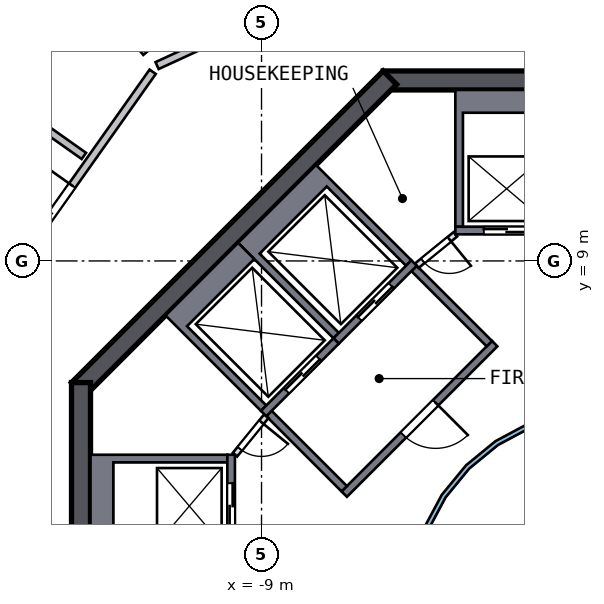
"""IFC4 building model, lengths in metres.
Left out: names, types, materials, properties, quantities, classifications, styles, units other than length and angle.
Written with IfcOpenShell. Run it as: python <this file> out.ifc"""

import sys

from ifc_helpers import new_model, si_unit, direction, frame, frame_2d, origin, place, context, subcontext, project, spatial, polyline, rectangle, outline, extrude, element, fill, save


model = new_model("IFC4")
c1 = context("Model", 3, precision=1e-05, world=origin(), true_north=direction((0.0, 1.0)))
c2 = subcontext(c1, "Body", "Model", "MODEL_VIEW")
j1 = project(units=[si_unit("LENGTHUNIT", "METRE"), si_unit("PLANEANGLEUNIT", "RADIAN")], contexts=[c1])
p1 = place(None, origin())
s1 = spatial("IfcSite", under=j1, at=p1, CompositionType="ELEMENT")
p2 = place(p1, origin())
s2 = spatial("IfcBuilding", under=s1, at=p2, CompositionType="ELEMENT")
p3 = place(p2, frame((0.0, 0.0, 256.0)))
s3 = spatial("IfcBuildingStorey", under=s2, at=p3, CompositionType="ELEMENT", Elevation=256.0)
p4 = place(p3, frame((5.799, 13.75, 0.0), z_axis=(0.0, 0.0, 1.0), x_axis=(-1.0, 0.0, 0.0)))
e1 = element("IfcWall", 1, at=p4, inside=s3, PredefinedType="SHEAR", context=c2, shape_type="SweptSolid", body=[
    extrude(rectangle(XDim=11.598, YDim=0.5, at=frame_2d((5.799, 0.0))), origin(), (0.0, 0.0, 1.0), 3.5),
])
p5 = place(p4, frame((4.899, 0.0, 0.0)))
e2 = element("IfcOpeningElement", 2, at=p5, cuts=e1, PredefinedType="OPENING", context=c2, shape_type="SweptSolid", body=[
    extrude(rectangle(XDim=1.8, YDim=2.1, at=frame_2d((0.9, 1.05))), frame((0.0, 0.26, 0.0), z_axis=(0.0, -1.0, 0.0), x_axis=(1.0, 0.0, 0.0)), (0.0, 0.0, 1.0), 0.52),
])
p6 = place(p3, frame((-5.622, 13.823, 0.0), z_axis=(0.0, 0.0, 1.0), x_axis=(-0.707106781, -0.707106781, 0.0)))
e3 = element("IfcWall", 3, at=p6, inside=s3, PredefinedType="SHEAR", context=c2, shape_type="SweptSolid", body=[
    extrude(rectangle(XDim=11.598, YDim=0.5, at=frame_2d((5.799, 0.0))), origin(), (0.0, 0.0, 1.0), 3.5),
])
p7 = place(p3, frame((-13.75, 5.799, 0.0), z_axis=(0.0, 0.0, 1.0), x_axis=(0.0, -1.0, 0.0)))
e4 = element("IfcWall", 4, at=p7, inside=s3, PredefinedType="SHEAR", context=c2, shape_type="SweptSolid", body=[
    extrude(rectangle(XDim=11.598, YDim=0.5, at=frame_2d((5.799, 0.0))), origin(), (0.0, 0.0, 1.0), 3.5),
])
p8 = place(p7, frame((4.899, 0.0, 0.0)))
e5 = element("IfcOpeningElement", 5, at=p8, cuts=e4, PredefinedType="OPENING", context=c2, shape_type="SweptSolid", body=[
    extrude(rectangle(XDim=1.8, YDim=2.1, at=frame_2d((0.9, 1.05))), frame((0.0, 0.26, 0.0), z_axis=(0.0, -1.0, 0.0), x_axis=(1.0, 0.0, 0.0)), (0.0, 0.0, 1.0), 0.52),
])
p9 = place(p3, origin())
e6 = element("IfcWall", 6, at=p9, inside=s3, PredefinedType="SOLIDWALL", context=c2, shape_type="SweptSolid", body=[
    extrude(outline(polyline([(-3.9, 13.5), (-1.2, 13.5), (-1.2, 9.9), (-1.4, 9.9), (-1.4, 12.9), (-3.7, 12.9), (-3.7, 9.9), (-3.9, 9.9), (-3.9, 13.5)])), origin(), (0.0, 0.0, 1.0), 3.19),
])
p10 = place(p3, frame((-1.2, 9.8, 0.0), z_axis=(0.0, 0.0, 1.0), x_axis=(-1.0, 0.0, 0.0)))
e7 = element("IfcWall", 7, at=p10, inside=s3, PredefinedType="SOLIDWALL", context=c2, shape_type="SweptSolid", body=[
    extrude(rectangle(XDim=2.7, YDim=0.2, at=frame_2d((1.35, 0.0))), origin(), (0.0, 0.0, 1.0), 3.19),
])
p11 = place(p10, frame((0.75, 0.0, 0.0)))
e8 = element("IfcOpeningElement", 8, at=p11, cuts=e7, PredefinedType="OPENING", context=c2, shape_type="SweptSolid", body=[
    extrude(rectangle(XDim=1.2, YDim=2.1, at=frame_2d((0.6, 1.05))), frame((0.0, 0.11, 0.0), z_axis=(0.0, -1.0, 0.0), x_axis=(1.0, 0.0, 0.0)), (0.0, 0.0, 1.0), 0.22),
])
p12 = place(p3, origin())
e9 = element("IfcWall", 9, at=p12, inside=s3, PredefinedType="SOLIDWALL", context=c2, shape_type="SweptSolid", body=[
    extrude(outline(polyline([(-13.5, 3.9), (-9.9, 3.9), (-9.9, 3.7), (-12.9, 3.7), (-12.9, 1.4), (-9.9, 1.4), (-9.9, 1.2), (-13.5, 1.2), (-13.5, 3.9)])), origin(), (0.0, 0.0, 1.0), 3.19),
])
p13 = place(p3, frame((-9.8, 1.2, 0.0), z_axis=(0.0, 0.0, 1.0), x_axis=(0.0, 1.0, 0.0)))
e10 = element("IfcWall", 10, at=p13, inside=s3, PredefinedType="SOLIDWALL", context=c2, shape_type="SweptSolid", body=[
    extrude(rectangle(XDim=2.7, YDim=0.2, at=frame_2d((1.35, 0.0))), origin(), (0.0, 0.0, 1.0), 3.19),
])
p14 = place(p13, frame((0.75, 0.0, 0.0)))
e11 = element("IfcOpeningElement", 11, at=p14, cuts=e10, PredefinedType="OPENING", context=c2, shape_type="SweptSolid", body=[
    extrude(rectangle(XDim=1.2, YDim=2.1, at=frame_2d((0.6, 1.05))), frame((0.0, 0.11, 0.0), z_axis=(0.0, -1.0, 0.0), x_axis=(1.0, 0.0, 0.0)), (0.0, 0.0, 1.0), 0.22),
])
p15 = place(p3, origin())
e12 = element("IfcWall", 12, at=p15, inside=s3, PredefinedType="SOLIDWALL", context=c2, shape_type="SweptSolid", body=[
    extrude(outline(polyline([(-9.617, 9.475), (-7.566, 11.526), (-5.056, 9.016), (-5.197, 8.874), (-7.283, 10.96), (-9.051, 9.192), (-6.965, 7.106), (-7.106, 6.965), (-9.617, 9.475)])), origin(), (0.0, 0.0, 1.0), 3.19),
])
p16 = place(p3, frame((-4.985, 8.945, 0.0), z_axis=(0.0, 0.0, 1.0), x_axis=(-0.707106781, -0.707106781, 0.0)))
e13 = element("IfcWall", 13, at=p16, inside=s3, PredefinedType="SOLIDWALL", context=c2, shape_type="SweptSolid", body=[
    extrude(rectangle(XDim=2.9, YDim=0.2, at=frame_2d((1.45, 0.0))), origin(), (0.0, 0.0, 1.0), 3.19),
])
p17 = place(p16, frame((0.85, 0.0, 0.0)))
e14 = element("IfcOpeningElement", 14, at=p17, cuts=e13, PredefinedType="OPENING", context=c2, shape_type="SweptSolid", body=[
    extrude(rectangle(XDim=1.2, YDim=2.1, at=frame_2d((0.6, 1.05))), frame((0.0, 0.11, 0.0), z_axis=(0.0, -1.0, 0.0), x_axis=(1.0, 0.0, 0.0)), (0.0, 0.0, 1.0), 0.22),
])
p18 = place(p3, origin())
e15 = element("IfcWall", 15, at=p18, inside=s3, PredefinedType="SOLIDWALL", context=c2, shape_type="SweptSolid", body=[
    extrude(outline(polyline([(-11.526, 7.566), (-9.617, 9.475), (-9.192, 9.051), (-10.96, 7.283), (-8.874, 5.197), (-9.016, 5.056), (-11.526, 7.566)])), origin(), (0.0, 0.0, 1.0), 3.19),
])
p19 = place(p3, frame((-7.036, 6.894, 0.0), z_axis=(0.0, 0.0, 1.0), x_axis=(-0.707106781, -0.707106781, 0.0)))
e16 = element("IfcWall", 16, at=p19, inside=s3, PredefinedType="SOLIDWALL", context=c2, shape_type="SweptSolid", body=[
    extrude(rectangle(XDim=2.7, YDim=0.2, at=frame_2d((1.35, 0.0))), origin(), (0.0, 0.0, 1.0), 3.19),
])
p20 = place(p19, frame((0.65, 0.0, 0.0)))
e17 = element("IfcOpeningElement", 17, at=p20, cuts=e16, PredefinedType="OPENING", context=c2, shape_type="SweptSolid", body=[
    extrude(rectangle(XDim=1.2, YDim=2.1, at=frame_2d((0.6, 1.05))), frame((0.0, 0.11, 0.0), z_axis=(0.0, -1.0, 0.0), x_axis=(1.0, 0.0, 0.0)), (0.0, 0.0, 1.0), 0.22),
])
p21 = place(p3, frame((-2.864, 6.823, 0.0), z_axis=(0.0, 0.0, 1.0), x_axis=(-0.707106781, -0.707106781, 0.0)))
e18 = element("IfcWall", 18, at=p21, inside=s3, PredefinedType="SOLIDWALL", context=c2, shape_type="SweptSolid", body=[
    extrude(rectangle(XDim=5.6, YDim=0.2, at=frame_2d((2.8, 0.0))), origin(), (0.0, 0.0, 1.0), 3.19),
])
p22 = place(p21, frame((2.2, 0.0, 0.0)))
e19 = element("IfcOpeningElement", 19, at=p22, cuts=e18, PredefinedType="OPENING", context=c2, shape_type="SweptSolid", body=[
    extrude(rectangle(XDim=1.2, YDim=2.1, at=frame_2d((0.6, 1.05))), frame((0.0, 0.11, 0.0), z_axis=(0.0, -1.0, 0.0), x_axis=(1.0, 0.0, 0.0)), (0.0, 0.0, 1.0), 0.22),
])
for number, where, z_axis, x_axis in (
    (20, (-3.005, 6.823, 0.0), (0.0, 0.0, 1.0), (-0.707, 0.707, 0.0)),
    (21, (-6.823, 3.005, 0.0), (0.0, 0.0, 1.0), (-0.707, 0.707, 0.0)),
):
    element("IfcWall", number, at=place(p3, frame(where, z_axis=z_axis, x_axis=x_axis)), inside=s3, PredefinedType="SOLIDWALL", context=c2, shape_type="SweptSolid", body=[
        extrude(rectangle(XDim=2.8, YDim=0.2, at=frame_2d((1.4, 0.0))), origin(), (0.0, 0.0, 1.0), 3.19),
    ])
p23 = place(p3, frame((-3.9, 9.7, 0.0), z_axis=(0.0, 0.0, 1.0), x_axis=(-0.775559878, -0.631274009, 0.0)))
e22 = element("IfcWall", 22, at=p23, inside=s3, PredefinedType="PARTITIONING", context=c2, shape_type="SweptSolid", body=[
    extrude(rectangle(XDim=1.308, YDim=0.15, at=frame_2d((0.654, 0.0))), origin(), (0.0, 0.0, 1.0), 3.19),
])
p24 = place(p23, frame((0.204, 0.0, 0.0)))
e23 = element("IfcOpeningElement", 23, at=p24, cuts=e22, PredefinedType="OPENING", context=c2, shape_type="SweptSolid", body=[
    extrude(rectangle(XDim=0.9, YDim=2.1, at=frame_2d((0.45, 1.05))), frame((0.0, 0.085, 0.0), z_axis=(0.0, -1.0, 0.0), x_axis=(1.0, 0.0, 0.0)), (0.0, 0.0, 1.0), 0.17),
])
p25 = place(p3, frame((-8.874, 4.914, 0.0), z_axis=(0.0, 0.0, 1.0), x_axis=(-0.631274009, -0.775559878, 0.0)))
e24 = element("IfcWall", 24, at=p25, inside=s3, PredefinedType="PARTITIONING", context=c2, shape_type="SweptSolid", body=[
    extrude(rectangle(XDim=1.308, YDim=0.15, at=frame_2d((0.654, 0.0))), origin(), (0.0, 0.0, 1.0), 3.19),
])
p26 = place(p25, frame((0.204, 0.0, 0.0)))
e25 = element("IfcOpeningElement", 25, at=p26, cuts=e24, PredefinedType="OPENING", context=c2, shape_type="SweptSolid", body=[
    extrude(rectangle(XDim=0.9, YDim=2.1, at=frame_2d((0.45, 1.05))), frame((0.0, 0.085, 0.0), z_axis=(0.0, -1.0, 0.0), x_axis=(1.0, 0.0, 0.0)), (0.0, 0.0, 1.0), 0.17),
])
p27 = place(p3, origin())
e26 = element("IfcWall", 26, at=p27, inside=s3, PredefinedType="SOLIDWALL", context=c2, shape_type="SweptSolid", body=[
    extrude(outline(polyline([(5.021, -0.999), (4.73, -1.959), (4.257, -2.844), (3.62, -3.62), (2.844, -4.257), (1.959, -4.73), (0.999, -5.021), (0.0, -5.12), (-0.999, -5.021), (-1.959, -4.73), (-2.844, -4.257), (-3.62, -3.62), (-4.257, -2.844), (-4.73, -1.959), (-5.021, -0.999), (-5.12, 0.0), (-5.021, 0.999), (-4.73, 1.959), (-4.257, 2.844), (-3.62, 3.62), (-2.844, 4.257), (-1.959, 4.73), (-0.999, 5.021), (0.0, 5.12), (0.999, 5.021), (1.959, 4.73), (2.844, 4.257), (3.62, 3.62), (4.257, 2.844), (4.73, 1.959), (5.021, 0.999), (5.12, 0.0), (5.021, -0.999)]), holes=[polyline([(4.904, 0.976), (4.619, 1.913), (4.157, 2.778), (3.535, 3.535), (2.778, 4.157), (1.913, 4.619), (0.976, 4.904), (0.0, 5.0), (-0.976, 4.904), (-1.913, 4.619), (-2.778, 4.157), (-3.535, 3.535), (-4.157, 2.778), (-4.619, 1.913), (-4.904, 0.976), (-5.0, 0.0), (-4.904, -0.976), (-4.619, -1.913), (-4.157, -2.778), (-3.535, -3.535), (-2.778, -4.157), (-1.913, -4.619), (-0.976, -4.904), (0.0, -5.0), (0.976, -4.904), (1.913, -4.619), (2.778, -4.157), (3.535, -3.535), (4.157, -2.778), (4.619, -1.913), (4.904, -0.976), (5.0, 0.0), (4.904, 0.976)])]), origin(), (0.0, 0.0, 1.0), 3.19),
])
p28 = place(p3, frame((-17.245, 6.372, 0.0), z_axis=(0.0, 0.0, 1.0), x_axis=(0.577581016, 0.81633337, 0.0)))
e27 = element("IfcWall", 27, at=p28, inside=s3, PredefinedType="SOLIDWALL", context=c2, shape_type="SweptSolid", body=[
    extrude(rectangle(XDim=9.317, YDim=0.2, at=frame_2d((4.658, 0.0))), origin(), (0.0, 0.0, 1.0), 3.19),
])
p29 = place(p28, frame((3.848, 0.0, 0.0)))
e28 = element("IfcOpeningElement", 28, at=p29, cuts=e27, PredefinedType="OPENING", context=c2, shape_type="SweptSolid", body=[
    extrude(rectangle(XDim=1.8, YDim=2.1, at=frame_2d((0.9, 1.05))), frame((0.0, 0.11, 0.0), z_axis=(0.0, -1.0, 0.0), x_axis=(1.0, 0.0, 0.0)), (0.0, 0.0, 1.0), 0.22),
])
p30 = place(p3, frame((-3.104, 18.121, 0.0), z_axis=(0.0, 0.0, 1.0), x_axis=(-0.908361445, -0.418185945, 0.0)))
e29 = element("IfcWall", 29, at=p30, inside=s3, PredefinedType="SOLIDWALL", context=c2, shape_type="SweptSolid", body=[
    extrude(rectangle(XDim=9.516, YDim=0.2, at=frame_2d((4.758, 0.0))), origin(), (0.0, 0.0, 1.0), 3.19),
])
p31 = place(p3, frame((-22.085, 17.714, 0.0), z_axis=(0.0, 0.0, 1.0), x_axis=(0.816344784, -0.577564883, 0.0)))
e30 = element("IfcWall", 30, at=p31, inside=s3, PredefinedType="SOLIDWALL", context=c2, shape_type="SweptSolid", body=[
    extrude(rectangle(XDim=10.302, YDim=0.2, at=frame_2d((5.151, 0.0))), origin(), (0.0, 0.0, 1.0), 3.19),
])
p32 = place(p31, frame((2.5, 0.0, 0.0)))
e31 = element("IfcOpeningElement", 31, at=p32, cuts=e30, PredefinedType="OPENING", context=c2, shape_type="SweptSolid", body=[
    extrude(rectangle(XDim=1.0, YDim=2.1, at=frame_2d((0.5, 1.05))), frame((0.0, 0.11, 0.0), z_axis=(0.0, -1.0, 0.0), x_axis=(1.0, 0.0, 0.0)), (0.0, 0.0, 1.0), 0.22),
])
p33 = place(p3, frame((-15.953, 19.202, 0.0), z_axis=(0.0, 0.0, 1.0), x_axis=(0.639032378, -0.769179836, 0.0)))
e32 = element("IfcWall", 32, at=p33, inside=s3, PredefinedType="SOLIDWALL", context=c2, shape_type="SweptSolid", body=[
    extrude(rectangle(XDim=6.132, YDim=0.2, at=frame_2d((3.066, 0.0))), origin(), (0.0, 0.0, 1.0), 3.19),
])
p34 = place(p11, origin())
e33 = element("IfcDoor", 33, at=p34, inside=s3, OperationType="DOUBLE_DOOR_SLIDING", PredefinedType="DOOR", context=c2, shape_type="SweptSolid", body=[
    extrude(rectangle(XDim=1.2, YDim=2.1, at=frame_2d((0.6, 1.05))), frame((0.0, 0.025, 0.0), z_axis=(0.0, -1.0, 0.0), x_axis=(1.0, 0.0, 0.0)), (0.0, 0.0, 1.0), 0.05),
])
fill(e8, e33)
p35 = place(p14, origin())
e34 = element("IfcDoor", 34, at=p35, inside=s3, OperationType="DOUBLE_DOOR_SLIDING", PredefinedType="DOOR", context=c2, shape_type="SweptSolid", body=[
    extrude(rectangle(XDim=1.2, YDim=2.1, at=frame_2d((0.6, 1.05))), frame((0.0, 0.025, 0.0), z_axis=(0.0, -1.0, 0.0), x_axis=(1.0, 0.0, 0.0)), (0.0, 0.0, 1.0), 0.05),
])
fill(e11, e34)
p36 = place(p17, origin())
e35 = element("IfcDoor", 35, at=p36, inside=s3, OperationType="DOUBLE_DOOR_SLIDING", PredefinedType="DOOR", context=c2, shape_type="SweptSolid", body=[
    extrude(rectangle(XDim=1.2, YDim=2.1, at=frame_2d((0.6, 1.05))), frame((0.0, 0.025, 0.0), z_axis=(0.0, -1.0, 0.0), x_axis=(1.0, 0.0, 0.0)), (0.0, 0.0, 1.0), 0.05),
])
fill(e14, e35)
p37 = place(p20, origin())
e36 = element("IfcDoor", 36, at=p37, inside=s3, OperationType="DOUBLE_DOOR_SLIDING", PredefinedType="DOOR", context=c2, shape_type="SweptSolid", body=[
    extrude(rectangle(XDim=1.2, YDim=2.1, at=frame_2d((0.6, 1.05))), frame((0.0, 0.025, 0.0), z_axis=(0.0, -1.0, 0.0), x_axis=(1.0, 0.0, 0.0)), (0.0, 0.0, 1.0), 0.05),
])
fill(e17, e36)
p38 = place(p22, origin())
e37 = element("IfcDoor", 37, at=p38, inside=s3, OperationType="SINGLE_SWING_LEFT", PredefinedType="DOOR", context=c2, shape_type="SweptSolid", body=[
    extrude(rectangle(XDim=1.2, YDim=2.1, at=frame_2d((0.6, 1.05))), frame((0.0, 0.025, 0.0), z_axis=(0.0, -1.0, 0.0), x_axis=(1.0, 0.0, 0.0)), (0.0, 0.0, 1.0), 0.05),
])
fill(e19, e37)
p39 = place(p24, origin())
e38 = element("IfcDoor", 38, at=p39, inside=s3, OperationType="SINGLE_SWING_LEFT", PredefinedType="DOOR", context=c2, shape_type="SweptSolid", body=[
    extrude(rectangle(XDim=0.9, YDim=2.1, at=frame_2d((0.45, 1.05))), frame((0.0, 0.025, 0.0), z_axis=(0.0, -1.0, 0.0), x_axis=(1.0, 0.0, 0.0)), (0.0, 0.0, 1.0), 0.05),
])
fill(e23, e38)
p40 = place(p26, origin())
e39 = element("IfcDoor", 39, at=p40, inside=s3, OperationType="SINGLE_SWING_LEFT", PredefinedType="DOOR", context=c2, shape_type="SweptSolid", body=[
    extrude(rectangle(XDim=0.9, YDim=2.1, at=frame_2d((0.45, 1.05))), frame((0.0, 0.025, 0.0), z_axis=(0.0, -1.0, 0.0), x_axis=(1.0, 0.0, 0.0)), (0.0, 0.0, 1.0), 0.05),
])
fill(e25, e39)
p41 = place(p29, origin())
e40 = element("IfcDoor", 40, at=p41, inside=s3, OperationType="DOUBLE_DOOR_SINGLE_SWING", PredefinedType="DOOR", context=c2, shape_type="SweptSolid", body=[
    extrude(rectangle(XDim=1.8, YDim=2.1, at=frame_2d((0.9, 1.05))), frame((0.0, 0.025, 0.0), z_axis=(0.0, -1.0, 0.0), x_axis=(1.0, 0.0, 0.0)), (0.0, 0.0, 1.0), 0.05),
])
fill(e28, e40)
save(model, sys.argv[1])
